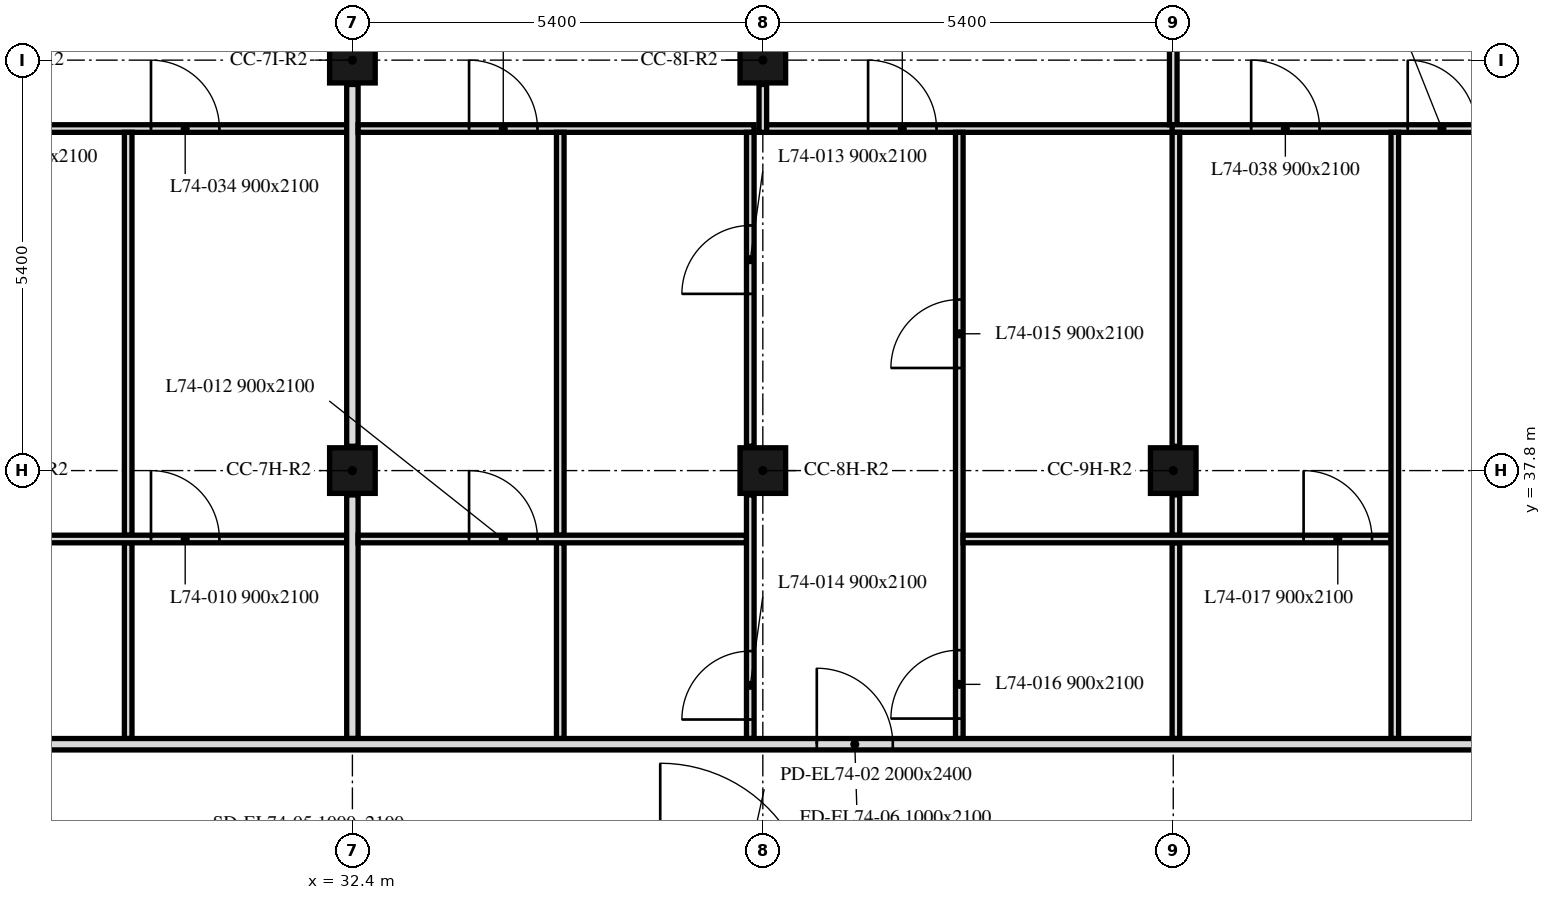
"""IFC4 building model, lengths in metres.
Left out: names, types, materials, properties, quantities, classifications, styles, units other than length and angle.
Written with IfcOpenShell. Run it as: python <this file> out.ifc"""

import sys

from ifc_helpers import new_model, si_unit, direction, frame, frame_2d, origin, origin_2d, place, context, subcontext, project, spatial, rectangle, extrude, element, fill, save


model = new_model("IFC4")
c1 = context("Model", 3, precision=1e-05, world=origin(), true_north=direction((0.0, 1.0)))
c2 = subcontext(c1, "Body", "Model", "MODEL_VIEW")
j1 = project(units=[si_unit("LENGTHUNIT", "METRE"), si_unit("PLANEANGLEUNIT", "RADIAN")], contexts=[c1])
p1 = place(None, origin())
s1 = spatial("IfcSite", under=j1, at=p1, CompositionType="ELEMENT")
p2 = place(p1, origin())
s2 = spatial("IfcBuilding", under=s1, at=p2, CompositionType="ELEMENT")
p3 = place(p2, frame((0.0, 0.0, 298.3)))
s3 = spatial("IfcBuildingStorey", under=s2, at=p3, CompositionType="ELEMENT", Elevation=298.3)
for number, where, z_axis, x_axis in (
    (1, (32.4, 37.8, 0.0), (0.0, 0.0, 1.0), (1.0, 0.0, 0.0)),
    (2, (37.8, 37.8, 0.0), (0.0, 0.0, 1.0), (1.0, 0.0, 0.0)),
    (3, (43.2, 37.8, 0.0), (0.0, 0.0, 1.0), (1.0, 0.0, 0.0)),
    (4, (32.4, 43.2, 0.0), (0.0, 0.0, 1.0), (1.0, 0.0, 0.0)),
    (5, (37.8, 43.2, 0.0), (0.0, 0.0, 1.0), (1.0, 0.0, 0.0)),
):
    element("IfcColumn", number, at=place(p3, frame(where, z_axis=z_axis, x_axis=x_axis)), inside=s3, PredefinedType="COLUMN", context=c2, shape_type="SweptSolid", body=[
        extrude(rectangle(XDim=0.6, YDim=0.6, at=origin_2d()), origin(), (0.0, 0.0, 1.0), 3.0),
    ])
p4 = place(p3, frame((47.901, 43.051, 0.0), z_axis=(0.0, 0.0, 1.0), x_axis=(-0.707106781187, 0.707106781187, 0.0)))
e6 = element("IfcWall", 6, at=p4, inside=s3, PredefinedType="SOLIDWALL", context=c2, shape_type="SweptSolid", body=[
    extrude(rectangle(XDim=6.86, YDim=0.3, at=frame_2d((3.43, 0.0))), origin(), (0.0, 0.0, 1.0), 3.0),
])
p5 = place(p4, frame((1.28, 0.0, 0.9)))
e7 = element("IfcOpeningElement", 7, at=p5, cuts=e6, PredefinedType="OPENING", context=c2, shape_type="SweptSolid", body=[
    extrude(rectangle(XDim=1.1, YDim=1.7, at=frame_2d((0.55, 0.85))), frame((0.0, 0.16, 0.0), z_axis=(0.0, -1.0, 0.0), x_axis=(1.0, 0.0, 0.0)), (0.0, 0.0, 1.0), 0.32),
])
p6 = place(p4, frame((4.48, 0.0, 0.9)))
e8 = element("IfcOpeningElement", 8, at=p6, cuts=e6, PredefinedType="OPENING", context=c2, shape_type="SweptSolid", body=[
    extrude(rectangle(XDim=1.1, YDim=1.7, at=frame_2d((0.55, 0.85))), frame((0.0, 0.16, 0.0), z_axis=(0.0, -1.0, 0.0), x_axis=(1.0, 0.0, 0.0)), (0.0, 0.0, 1.0), 0.32),
])
p7 = place(p3, frame((27.05, 42.3, 0.0), z_axis=(0.0, 0.0, 1.0), x_axis=(1.0, 0.0, 0.0)))
e9 = element("IfcWall", 9, at=p7, inside=s3, PredefinedType="PARTITIONING", context=c2, shape_type="SweptSolid", body=[
    extrude(rectangle(XDim=5.275, YDim=0.1, at=frame_2d((2.637, 0.0))), origin(), (0.0, 0.0, 1.0), 3.0),
])
p8 = place(p7, frame((2.7, 0.0, 0.0)))
e10 = element("IfcOpeningElement", 10, at=p8, cuts=e9, PredefinedType="OPENING", context=c2, shape_type="SweptSolid", body=[
    extrude(rectangle(XDim=0.9, YDim=2.1, at=frame_2d((0.45, 1.05))), frame((0.0, 0.05, 0.0), z_axis=(0.0, -1.0, 0.0), x_axis=(1.0, 0.0, 0.0)), (0.0, 0.0, 1.0), 0.1),
])
p9 = place(p3, frame((29.45, 36.95, 0.0), z_axis=(0.0, 0.0, 1.0), x_axis=(0.0, 1.0, 0.0)))
e11 = element("IfcWall", 11, at=p9, inside=s3, PredefinedType="PARTITIONING", context=c2, shape_type="SweptSolid", body=[
    extrude(rectangle(XDim=5.3, YDim=0.1, at=frame_2d((2.65, 0.0))), origin(), (0.0, 0.0, 1.0), 3.0),
])
p10 = place(p3, frame((29.45, 34.275, 0.0), z_axis=(0.0, 0.0, 1.0), x_axis=(0.0, 1.0, 0.0)))
e12 = element("IfcWall", 12, at=p10, inside=s3, PredefinedType="PARTITIONING", context=c2, shape_type="SweptSolid", body=[
    extrude(rectangle(XDim=2.575, YDim=0.1, at=frame_2d((1.288, 0.0))), origin(), (0.0, 0.0, 1.0), 3.0),
])
p11 = place(p3, frame((26.772, 36.9, 0.0), z_axis=(0.0, 0.0, 1.0), x_axis=(1.0, 0.0, 0.0)))
e13 = element("IfcWall", 13, at=p11, inside=s3, PredefinedType="PARTITIONING", context=c2, shape_type="SweptSolid", body=[
    extrude(rectangle(XDim=5.553, YDim=0.1, at=frame_2d((2.776, 0.0))), origin(), (0.0, 0.0, 1.0), 2.4),
])
p12 = place(p11, frame((2.978, 0.0, 0.0)))
e14 = element("IfcOpeningElement", 14, at=p12, cuts=e13, PredefinedType="OPENING", context=c2, shape_type="SweptSolid", body=[
    extrude(rectangle(XDim=0.9, YDim=2.1, at=frame_2d((0.45, 1.05))), frame((0.0, 0.05, 0.0), z_axis=(0.0, -1.0, 0.0), x_axis=(1.0, 0.0, 0.0)), (0.0, 0.0, 1.0), 0.1),
])
p13 = place(p3, frame((32.4, 38.12, 0.0), z_axis=(0.0, 0.0, 1.0), x_axis=(0.0, 1.0, 0.0)))
e15 = element("IfcWall", 15, at=p13, inside=s3, PredefinedType="PARTITIONING", context=c2, shape_type="SweptSolid", body=[
    extrude(rectangle(XDim=4.76, YDim=0.15, at=frame_2d((2.38, 0.0))), origin(), (0.0, 0.0, 1.0), 2.4),
])
p14 = place(p3, frame((32.4, 34.275, 0.0), z_axis=(0.0, 0.0, 1.0), x_axis=(0.0, 1.0, 0.0)))
e16 = element("IfcWall", 16, at=p14, inside=s3, PredefinedType="PARTITIONING", context=c2, shape_type="SweptSolid", body=[
    extrude(rectangle(XDim=3.205, YDim=0.15, at=frame_2d((1.603, 0.0))), origin(), (0.0, 0.0, 1.0), 2.4),
])
p15 = place(p3, frame((32.475, 42.3, 0.0), z_axis=(0.0, 0.0, 1.0), x_axis=(1.0, 0.0, 0.0)))
e17 = element("IfcWall", 17, at=p15, inside=s3, PredefinedType="PARTITIONING", context=c2, shape_type="SweptSolid", body=[
    extrude(rectangle(XDim=5.21, YDim=0.1, at=frame_2d((2.605, 0.0))), origin(), (0.0, 0.0, 1.0), 3.0),
])
p16 = place(p15, frame((1.46, 0.0, 0.0)))
e18 = element("IfcOpeningElement", 18, at=p16, cuts=e17, PredefinedType="OPENING", context=c2, shape_type="SweptSolid", body=[
    extrude(rectangle(XDim=0.9, YDim=2.1, at=frame_2d((0.45, 1.05))), frame((0.0, 0.05, 0.0), z_axis=(0.0, -1.0, 0.0), x_axis=(1.0, 0.0, 0.0)), (0.0, 0.0, 1.0), 0.1),
])
p17 = place(p3, frame((37.8, 42.25, 0.0), z_axis=(0.0, 0.0, 1.0), x_axis=(0.0, 1.0, 0.0)))
e19 = element("IfcWall", 19, at=p17, inside=s3, PredefinedType="PARTITIONING", context=c2, shape_type="SweptSolid", body=[
    extrude(rectangle(XDim=0.63, YDim=0.1, at=frame_2d((0.315, 0.0))), origin(), (0.0, 0.0, 1.0), 2.4),
])
p18 = place(p3, frame((37.85, 42.3, 0.0), z_axis=(0.0, 0.0, 1.0), x_axis=(1.0, 0.0, 0.0)))
e20 = element("IfcWall", 20, at=p18, inside=s3, PredefinedType="PARTITIONING", context=c2, shape_type="SweptSolid", body=[
    extrude(rectangle(XDim=5.4, YDim=0.1, at=frame_2d((2.7, 0.0))), origin(), (0.0, 0.0, 1.0), 3.0),
])
p19 = place(p18, frame((1.335, 0.0, 0.0)))
e21 = element("IfcOpeningElement", 21, at=p19, cuts=e20, PredefinedType="OPENING", context=c2, shape_type="SweptSolid", body=[
    extrude(rectangle(XDim=0.9, YDim=2.1, at=frame_2d((0.45, 1.05))), frame((0.0, 0.05, 0.0), z_axis=(0.0, -1.0, 0.0), x_axis=(1.0, 0.0, 0.0)), (0.0, 0.0, 1.0), 0.1),
])
p20 = place(p3, frame((43.2, 42.35, 0.0), z_axis=(0.0, 0.0, 1.0), x_axis=(0.0, 1.0, 0.0)))
e22 = element("IfcWall", 22, at=p20, inside=s3, PredefinedType="PARTITIONING", context=c2, shape_type="SweptSolid", body=[
    extrude(rectangle(XDim=5.138, YDim=0.1, at=frame_2d((2.569, 0.0))), origin(), (0.0, 0.0, 1.0), 3.0),
])
p21 = place(p20, frame((2.65, 0.0, 0.0)))
e23 = element("IfcOpeningElement", 23, at=p21, cuts=e22, PredefinedType="OPENING", context=c2, shape_type="SweptSolid", body=[
    extrude(rectangle(XDim=0.9, YDim=2.1, at=frame_2d((0.45, 1.05))), frame((0.0, 0.05, 0.0), z_axis=(0.0, -1.0, 0.0), x_axis=(1.0, 0.0, 0.0)), (0.0, 0.0, 1.0), 0.1),
])
p22 = place(p3, frame((43.185, 42.3, 0.0), z_axis=(0.0, 0.0, 1.0), x_axis=(1.0, 0.0, 0.0)))
e24 = element("IfcWall", 24, at=p22, inside=s3, PredefinedType="PARTITIONING", context=c2, shape_type="SweptSolid", body=[
    extrude(rectangle(XDim=4.664, YDim=0.1, at=frame_2d((2.332, 0.0))), origin(), (0.0, 0.0, 1.0), 3.0),
])
p23 = place(p22, frame((3.1, 0.0, 0.0)))
e25 = element("IfcOpeningElement", 25, at=p23, cuts=e24, PredefinedType="OPENING", context=c2, shape_type="SweptSolid", body=[
    extrude(rectangle(XDim=0.9, YDim=2.1, at=frame_2d((0.45, 1.05))), frame((0.0, 0.05, 0.0), z_axis=(0.0, -1.0, 0.0), x_axis=(1.0, 0.0, 0.0)), (0.0, 0.0, 1.0), 0.1),
])
p24 = place(p22, frame((1.04, 0.0, 0.0)))
e26 = element("IfcOpeningElement", 26, at=p24, cuts=e24, PredefinedType="OPENING", context=c2, shape_type="SweptSolid", body=[
    extrude(rectangle(XDim=0.9, YDim=2.1, at=frame_2d((0.45, 1.05))), frame((0.0, 0.05, 0.0), z_axis=(0.0, -1.0, 0.0), x_axis=(1.0, 0.0, 0.0)), (0.0, 0.0, 1.0), 0.1),
])
p25 = place(p3, frame((35.135, 36.95, 0.0), z_axis=(0.0, 0.0, 1.0), x_axis=(0.0, 1.0, 0.0)))
e27 = element("IfcWall", 27, at=p25, inside=s3, PredefinedType="PARTITIONING", context=c2, shape_type="SweptSolid", body=[
    extrude(rectangle(XDim=5.3, YDim=0.1, at=frame_2d((2.65, 0.0))), origin(), (0.0, 0.0, 1.0), 2.4),
])
p26 = place(p3, frame((35.135, 34.275, 0.0), z_axis=(0.0, 0.0, 1.0), x_axis=(0.0, 1.0, 0.0)))
e28 = element("IfcWall", 28, at=p26, inside=s3, PredefinedType="PARTITIONING", context=c2, shape_type="SweptSolid", body=[
    extrude(rectangle(XDim=2.575, YDim=0.1, at=frame_2d((1.288, 0.0))), origin(), (0.0, 0.0, 1.0), 3.0),
])
p27 = place(p3, frame((32.475, 36.9, 0.0), z_axis=(0.0, 0.0, 1.0), x_axis=(1.0, 0.0, 0.0)))
e29 = element("IfcWall", 29, at=p27, inside=s3, PredefinedType="PARTITIONING", context=c2, shape_type="SweptSolid", body=[
    extrude(rectangle(XDim=5.11, YDim=0.1, at=frame_2d((2.555, 0.0))), origin(), (0.0, 0.0, 1.0), 3.0),
])
p28 = place(p27, frame((1.46, 0.0, 0.0)))
e30 = element("IfcOpeningElement", 30, at=p28, cuts=e29, PredefinedType="OPENING", context=c2, shape_type="SweptSolid", body=[
    extrude(rectangle(XDim=0.9, YDim=2.1, at=frame_2d((0.45, 1.05))), frame((0.0, 0.05, 0.0), z_axis=(0.0, -1.0, 0.0), x_axis=(1.0, 0.0, 0.0)), (0.0, 0.0, 1.0), 0.1),
])
p29 = place(p3, frame((37.635, 38.12, 0.0), z_axis=(0.0, 0.0, 1.0), x_axis=(0.0, 1.0, 0.0)))
e31 = element("IfcWall", 31, at=p29, inside=s3, PredefinedType="PARTITIONING", context=c2, shape_type="SweptSolid", body=[
    extrude(rectangle(XDim=4.13, YDim=0.1, at=frame_2d((2.065, 0.0))), origin(), (0.0, 0.0, 1.0), 2.4),
])
p30 = place(p29, frame((2.005, 0.0, 0.0)))
e32 = element("IfcOpeningElement", 32, at=p30, cuts=e31, PredefinedType="OPENING", context=c2, shape_type="SweptSolid", body=[
    extrude(rectangle(XDim=0.9, YDim=2.1, at=frame_2d((0.45, 1.05))), frame((0.0, 0.05, 0.0), z_axis=(0.0, -1.0, 0.0), x_axis=(1.0, 0.0, 0.0)), (0.0, 0.0, 1.0), 0.1),
])
p31 = place(p3, frame((37.635, 34.275, 0.0), z_axis=(0.0, 0.0, 1.0), x_axis=(0.0, 1.0, 0.0)))
e33 = element("IfcWall", 33, at=p31, inside=s3, PredefinedType="PARTITIONING", context=c2, shape_type="SweptSolid", body=[
    extrude(rectangle(XDim=3.205, YDim=0.1, at=frame_2d((1.603, 0.0))), origin(), (0.0, 0.0, 1.0), 2.4),
])
p32 = place(p31, frame((0.25, 0.0, 0.0)))
e34 = element("IfcOpeningElement", 34, at=p32, cuts=e33, PredefinedType="OPENING", context=c2, shape_type="SweptSolid", body=[
    extrude(rectangle(XDim=0.9, YDim=2.1, at=frame_2d((0.45, 1.05))), frame((0.0, 0.05, 0.0), z_axis=(0.0, -1.0, 0.0), x_axis=(1.0, 0.0, 0.0)), (0.0, 0.0, 1.0), 0.1),
])
p33 = place(p3, frame((40.385, 34.275, 0.0), z_axis=(0.0, 0.0, 1.0), x_axis=(0.0, 1.0, 0.0)))
e35 = element("IfcWall", 35, at=p33, inside=s3, PredefinedType="PARTITIONING", context=c2, shape_type="SweptSolid", body=[
    extrude(rectangle(XDim=7.975, YDim=0.1, at=frame_2d((3.988, 0.0))), origin(), (0.0, 0.0, 1.0), 2.4),
])
p34 = place(p33, frame((4.875, 0.0, 0.0)))
e36 = element("IfcOpeningElement", 36, at=p34, cuts=e35, PredefinedType="OPENING", context=c2, shape_type="SweptSolid", body=[
    extrude(rectangle(XDim=0.9, YDim=2.1, at=frame_2d((0.45, 1.05))), frame((0.0, 0.05, 0.0), z_axis=(0.0, -1.0, 0.0), x_axis=(1.0, 0.0, 0.0)), (0.0, 0.0, 1.0), 0.1),
])
p35 = place(p33, frame((0.262, 0.0, 0.0)))
e37 = element("IfcOpeningElement", 37, at=p35, cuts=e35, PredefinedType="OPENING", context=c2, shape_type="SweptSolid", body=[
    extrude(rectangle(XDim=0.9, YDim=2.1, at=frame_2d((0.45, 1.05))), frame((0.0, 0.05, 0.0), z_axis=(0.0, -1.0, 0.0), x_axis=(1.0, 0.0, 0.0)), (0.0, 0.0, 1.0), 0.1),
])
p36 = place(p3, frame((43.235, 36.95, 0.0), z_axis=(0.0, 0.0, 1.0), x_axis=(0.0, 1.0, 0.0)))
e38 = element("IfcWall", 38, at=p36, inside=s3, PredefinedType="PARTITIONING", context=c2, shape_type="SweptSolid", body=[
    extrude(rectangle(XDim=0.53, YDim=0.1, at=frame_2d((0.265, 0.0))), origin(), (0.0, 0.0, 1.0), 3.0),
])
p37 = place(p3, frame((43.235, 38.12, 0.0), z_axis=(0.0, 0.0, 1.0), x_axis=(0.0, 1.0, 0.0)))
e39 = element("IfcWall", 39, at=p37, inside=s3, PredefinedType="PARTITIONING", context=c2, shape_type="SweptSolid", body=[
    extrude(rectangle(XDim=4.13, YDim=0.1, at=frame_2d((2.065, 0.0))), origin(), (0.0, 0.0, 1.0), 3.0),
])
p38 = place(p3, frame((43.235, 34.275, 0.0), z_axis=(0.0, 0.0, 1.0), x_axis=(0.0, 1.0, 0.0)))
e40 = element("IfcWall", 40, at=p38, inside=s3, PredefinedType="PARTITIONING", context=c2, shape_type="SweptSolid", body=[
    extrude(rectangle(XDim=2.575, YDim=0.1, at=frame_2d((1.288, 0.0))), origin(), (0.0, 0.0, 1.0), 3.0),
])
p39 = place(p3, frame((40.435, 36.9, 0.0), z_axis=(0.0, 0.0, 1.0), x_axis=(1.0, 0.0, 0.0)))
e41 = element("IfcWall", 41, at=p39, inside=s3, PredefinedType="PARTITIONING", context=c2, shape_type="SweptSolid", body=[
    extrude(rectangle(XDim=5.63, YDim=0.1, at=frame_2d((2.815, 0.0))), origin(), (0.0, 0.0, 1.0), 3.0),
])
p40 = place(p39, frame((4.48, 0.0, 0.0)))
e42 = element("IfcOpeningElement", 42, at=p40, cuts=e41, PredefinedType="OPENING", context=c2, shape_type="SweptSolid", body=[
    extrude(rectangle(XDim=0.9, YDim=2.1, at=frame_2d((0.45, 1.05))), frame((0.0, 0.05, 0.0), z_axis=(0.0, -1.0, 0.0), x_axis=(1.0, 0.0, 0.0)), (0.0, 0.0, 1.0), 0.1),
])
p41 = place(p3, frame((46.115, 34.275, 0.0), z_axis=(0.0, 0.0, 1.0), x_axis=(0.0, 1.0, 0.0)))
e43 = element("IfcWall", 43, at=p41, inside=s3, PredefinedType="PARTITIONING", context=c2, shape_type="SweptSolid", body=[
    extrude(rectangle(XDim=7.975, YDim=0.1, at=frame_2d((3.988, 0.0))), origin(), (0.0, 0.0, 1.0), 2.4),
])
p42 = place(p3, frame((6.151, 34.2, 0.0), z_axis=(0.0, 0.0, 1.0), x_axis=(1.0, 0.0, 0.0)))
e44 = element("IfcWall", 44, at=p42, inside=s3, PredefinedType="PARTITIONING", context=c2, shape_type="SweptSolid", body=[
    extrude(rectangle(XDim=41.698, YDim=0.15, at=frame_2d((20.849, 0.0))), origin(), (0.0, 0.0, 1.0), 2.4),
])
p43 = place(p42, frame((2.939, 0.0, 0.0)))
e45 = element("IfcOpeningElement", 45, at=p43, cuts=e44, PredefinedType="OPENING", context=c2, shape_type="SweptSolid", body=[
    extrude(rectangle(XDim=1.0, YDim=2.1, at=frame_2d((0.5, 1.05))), frame((0.0, 0.075, 0.0), z_axis=(0.0, -1.0, 0.0), x_axis=(1.0, 0.0, 0.0)), (0.0, 0.0, 1.0), 0.15),
])
p44 = place(p42, frame((18.121, 0.0, 0.0)))
e46 = element("IfcOpeningElement", 46, at=p44, cuts=e44, PredefinedType="OPENING", context=c2, shape_type="SweptSolid", body=[
    extrude(rectangle(XDim=1.0, YDim=2.1, at=frame_2d((0.5, 1.05))), frame((0.0, 0.075, 0.0), z_axis=(0.0, -1.0, 0.0), x_axis=(1.0, 0.0, 0.0)), (0.0, 0.0, 1.0), 0.15),
])
p45 = place(p42, frame((32.359, 0.0, 0.0)))
e47 = element("IfcOpeningElement", 47, at=p45, cuts=e44, PredefinedType="OPENING", context=c2, shape_type="SweptSolid", body=[
    extrude(rectangle(XDim=1.0, YDim=2.1, at=frame_2d((0.5, 1.05))), frame((0.0, 0.075, 0.0), z_axis=(0.0, -1.0, 0.0), x_axis=(1.0, 0.0, 0.0)), (0.0, 0.0, 1.0), 0.15),
])
p46 = place(p12, origin())
e48 = element("IfcDoor", 48, at=p46, inside=s3, OperationType="SINGLE_SWING_LEFT", PredefinedType="DOOR", context=c2, shape_type="SweptSolid", body=[
    extrude(rectangle(XDim=0.9, YDim=2.1, at=frame_2d((0.45, 1.05))), frame((0.0, 0.025, 0.0), z_axis=(0.0, -1.0, 0.0), x_axis=(1.0, 0.0, 0.0)), (0.0, 0.0, 1.0), 0.05),
])
fill(e14, e48)
p47 = place(p23, origin())
e49 = element("IfcDoor", 49, at=p47, inside=s3, OperationType="SINGLE_SWING_RIGHT", PredefinedType="DOOR", context=c2, shape_type="SweptSolid", body=[
    extrude(rectangle(XDim=0.9, YDim=2.1, at=frame_2d((0.45, 1.05))), frame((0.0, 0.025, 0.0), z_axis=(0.0, -1.0, 0.0), x_axis=(1.0, 0.0, 0.0)), (0.0, 0.0, 1.0), 0.05),
])
fill(e25, e49)
p48 = place(p28, origin())
e50 = element("IfcDoor", 50, at=p48, inside=s3, OperationType="SINGLE_SWING_LEFT", PredefinedType="DOOR", context=c2, shape_type="SweptSolid", body=[
    extrude(rectangle(XDim=0.9, YDim=2.1, at=frame_2d((0.45, 1.05))), frame((0.0, 0.025, 0.0), z_axis=(0.0, -1.0, 0.0), x_axis=(1.0, 0.0, 0.0)), (0.0, 0.0, 1.0), 0.05),
])
fill(e30, e50)
p49 = place(p30, origin())
e51 = element("IfcDoor", 51, at=p49, inside=s3, OperationType="SINGLE_SWING_RIGHT", PredefinedType="DOOR", context=c2, shape_type="SweptSolid", body=[
    extrude(rectangle(XDim=0.9, YDim=2.1, at=frame_2d((0.45, 1.05))), frame((0.0, 0.025, 0.0), z_axis=(0.0, -1.0, 0.0), x_axis=(1.0, 0.0, 0.0)), (0.0, 0.0, 1.0), 0.05),
])
fill(e32, e51)
p50 = place(p32, origin())
e52 = element("IfcDoor", 52, at=p50, inside=s3, OperationType="SINGLE_SWING_LEFT", PredefinedType="DOOR", context=c2, shape_type="SweptSolid", body=[
    extrude(rectangle(XDim=0.9, YDim=2.1, at=frame_2d((0.45, 1.05))), frame((0.0, 0.025, 0.0), z_axis=(0.0, -1.0, 0.0), x_axis=(1.0, 0.0, 0.0)), (0.0, 0.0, 1.0), 0.05),
])
fill(e34, e52)
p51 = place(p34, origin())
e53 = element("IfcDoor", 53, at=p51, inside=s3, OperationType="SINGLE_SWING_LEFT", PredefinedType="DOOR", context=c2, shape_type="SweptSolid", body=[
    extrude(rectangle(XDim=0.9, YDim=2.1, at=frame_2d((0.45, 1.05))), frame((0.0, 0.025, 0.0), z_axis=(0.0, -1.0, 0.0), x_axis=(1.0, 0.0, 0.0)), (0.0, 0.0, 1.0), 0.05),
])
fill(e36, e53)
p52 = place(p35, origin())
e54 = element("IfcDoor", 54, at=p52, inside=s3, OperationType="SINGLE_SWING_LEFT", PredefinedType="DOOR", context=c2, shape_type="SweptSolid", body=[
    extrude(rectangle(XDim=0.9, YDim=2.1, at=frame_2d((0.45, 1.05))), frame((0.0, 0.025, 0.0), z_axis=(0.0, -1.0, 0.0), x_axis=(1.0, 0.0, 0.0)), (0.0, 0.0, 1.0), 0.05),
])
fill(e37, e54)
p53 = place(p40, origin())
e55 = element("IfcDoor", 55, at=p53, inside=s3, OperationType="SINGLE_SWING_LEFT", PredefinedType="DOOR", context=c2, shape_type="SweptSolid", body=[
    extrude(rectangle(XDim=0.9, YDim=2.1, at=frame_2d((0.45, 1.05))), frame((0.0, 0.025, 0.0), z_axis=(0.0, -1.0, 0.0), x_axis=(1.0, 0.0, 0.0)), (0.0, 0.0, 1.0), 0.05),
])
fill(e42, e55)
p54 = place(p8, origin())
e56 = element("IfcDoor", 56, at=p54, inside=s3, OperationType="SINGLE_SWING_LEFT", PredefinedType="DOOR", context=c2, shape_type="SweptSolid", body=[
    extrude(rectangle(XDim=0.9, YDim=2.1, at=frame_2d((0.45, 1.05))), frame((0.0, 0.025, 0.0), z_axis=(0.0, -1.0, 0.0), x_axis=(1.0, 0.0, 0.0)), (0.0, 0.0, 1.0), 0.05),
])
fill(e10, e56)
p55 = place(p16, origin())
e57 = element("IfcDoor", 57, at=p55, inside=s3, OperationType="SINGLE_SWING_RIGHT", PredefinedType="DOOR", context=c2, shape_type="SweptSolid", body=[
    extrude(rectangle(XDim=0.9, YDim=2.1, at=frame_2d((0.45, 1.05))), frame((0.0, 0.025, 0.0), z_axis=(0.0, -1.0, 0.0), x_axis=(1.0, 0.0, 0.0)), (0.0, 0.0, 1.0), 0.05),
])
fill(e18, e57)
p56 = place(p24, origin())
e58 = element("IfcDoor", 58, at=p56, inside=s3, OperationType="SINGLE_SWING_LEFT", PredefinedType="DOOR", context=c2, shape_type="SweptSolid", body=[
    extrude(rectangle(XDim=0.9, YDim=2.1, at=frame_2d((0.45, 1.05))), frame((0.0, 0.025, 0.0), z_axis=(0.0, -1.0, 0.0), x_axis=(1.0, 0.0, 0.0)), (0.0, 0.0, 1.0), 0.05),
])
fill(e26, e58)
p57 = place(p19, origin())
e59 = element("IfcDoor", 59, at=p57, inside=s3, OperationType="SINGLE_SWING_RIGHT", PredefinedType="DOOR", context=c2, shape_type="SweptSolid", body=[
    extrude(rectangle(XDim=0.9, YDim=2.1, at=frame_2d((0.45, 1.05))), frame((0.0, 0.025, 0.0), z_axis=(0.0, -1.0, 0.0), x_axis=(1.0, 0.0, 0.0)), (0.0, 0.0, 1.0), 0.05),
])
fill(e21, e59)
p58 = place(p45, origin())
e60 = element("IfcDoor", 60, at=p58, inside=s3, OperationType="SINGLE_SWING_LEFT", PredefinedType="DOOR", context=c2, shape_type="SweptSolid", body=[
    extrude(rectangle(XDim=1.0, YDim=2.1, at=frame_2d((0.5, 1.05))), frame((0.0, 0.025, 0.0), z_axis=(0.0, -1.0, 0.0), x_axis=(1.0, 0.0, 0.0)), (0.0, 0.0, 1.0), 0.05),
])
fill(e47, e60)
save(model, sys.argv[1])
